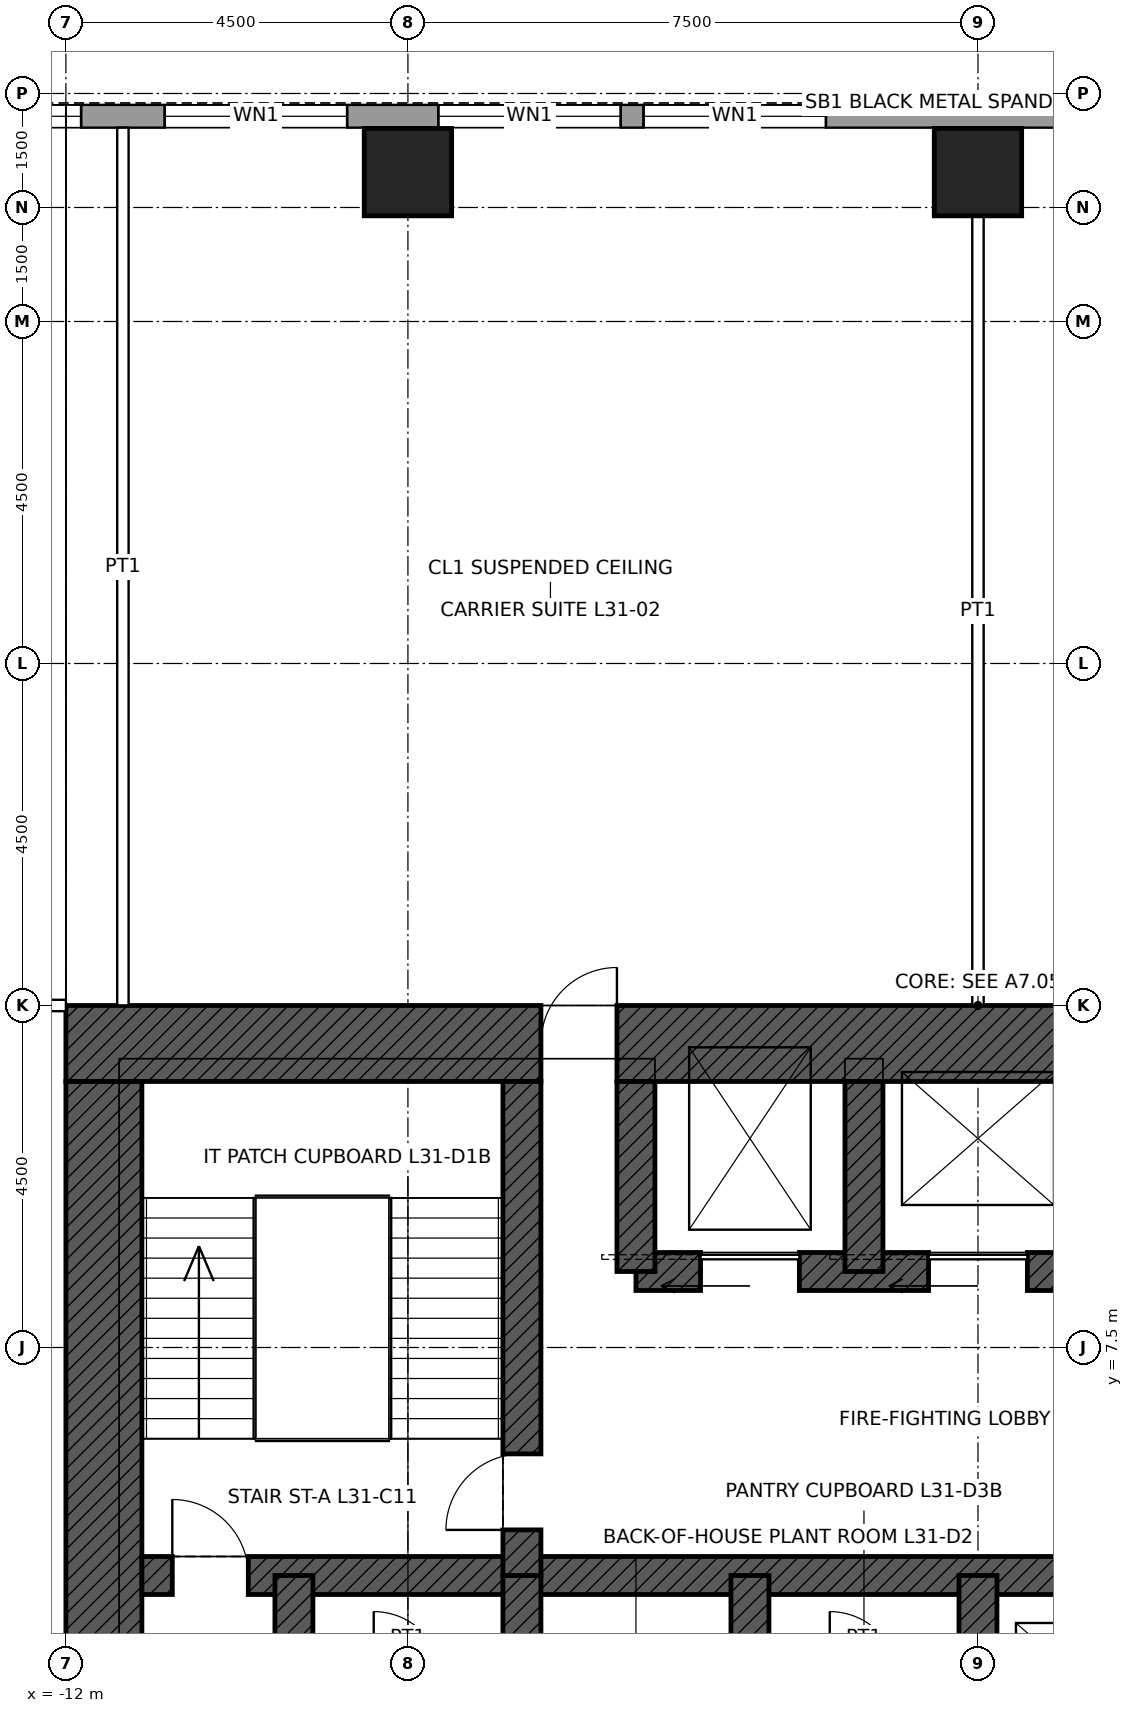
"""IFC4 building model, lengths in metres.
Left out: names, types, materials, properties, quantities, classifications, styles, units other than length and angle.
Written with IfcOpenShell. Run it as: python <this file> out.ifc"""

import sys

from ifc_helpers import new_model, si_unit, direction, frame, frame_2d, origin, origin_2d, place, context, subcontext, project, spatial, rectangle, hollow_rectangle, extrude, element, fill, save


model = new_model("IFC4")
c1 = context("Model", 3, precision=1e-05, world=origin(), true_north=direction((0.0, 1.0)))
c2 = subcontext(c1, "Body", "Model", "MODEL_VIEW")
j1 = project(units=[si_unit("LENGTHUNIT", "METRE"), si_unit("PLANEANGLEUNIT", "RADIAN")], contexts=[c1])
p1 = place(None, origin())
s1 = spatial("IfcSite", under=j1, at=p1, CompositionType="ELEMENT")
p2 = place(p1, origin())
s2 = spatial("IfcBuilding", under=s1, at=p2, CompositionType="ELEMENT")
p3 = place(p2, frame((0.0, 0.0, 153.9)))
s3 = spatial("IfcBuildingStorey", under=s2, at=p3, CompositionType="ELEMENT", Elevation=153.9)
for number, where, z_axis, x_axis in (
    (1, (-7.5, 22.965, 0.0), (0.0, 0.0, 1.0), (1.0, 0.0, 0.0)),
    (2, (0.0, 22.965, 0.0), (0.0, 0.0, 1.0), (1.0, 0.0, 0.0)),
):
    element("IfcColumn", number, at=place(p3, frame(where, z_axis=z_axis, x_axis=x_axis)), inside=s3, PredefinedType="COLUMN", context=c2, shape_type="SweptSolid", body=[
        extrude(hollow_rectangle(XDim=1.15, YDim=1.15, WallThickness=0.075, at=origin_2d()), origin(), (0.0, 0.0, 1.0), 4.5),
    ])
p4 = place(p3, frame((-12.0, 11.5, 0.0), z_axis=(0.0, 0.0, 1.0), x_axis=(1.0, 0.0, 0.0)))
e3 = element("IfcWall", 3, at=p4, inside=s3, PredefinedType="SHEAR", context=c2, shape_type="SweptSolid", body=[
    extrude(rectangle(XDim=24.0, YDim=1.0, at=frame_2d((12.0, 0.0))), origin(), (0.0, 0.0, 1.0), 4.5),
])
p5 = place(p4, frame((6.25, 0.0, 0.0)))
e4 = element("IfcOpeningElement", 4, at=p5, cuts=e3, PredefinedType="OPENING", context=c2, shape_type="SweptSolid", body=[
    extrude(rectangle(XDim=1.0, YDim=2.4, at=frame_2d((0.5, 1.2))), frame((0.0, 0.51, 0.0), z_axis=(0.0, -1.0, 0.0), x_axis=(1.0, 0.0, 0.0)), (0.0, 0.0, 1.0), 1.02),
])
p6 = place(p4, frame((16.75, 0.0, 0.0)))
e5 = element("IfcOpeningElement", 5, at=p6, cuts=e3, PredefinedType="OPENING", context=c2, shape_type="SweptSolid", body=[
    extrude(rectangle(XDim=1.0, YDim=2.4, at=frame_2d((0.5, 1.2))), frame((0.0, 0.51, 0.0), z_axis=(0.0, -1.0, 0.0), x_axis=(1.0, 0.0, 0.0)), (0.0, 0.0, 1.0), 1.02),
])
p7 = place(p3, frame((-11.5, -11.0, 0.0), z_axis=(0.0, 0.0, 1.0), x_axis=(0.0, 1.0, 0.0)))
e6 = element("IfcWall", 6, at=p7, inside=s3, PredefinedType="SHEAR", context=c2, shape_type="SweptSolid", body=[
    extrude(rectangle(XDim=22.0, YDim=1.0, at=frame_2d((11.0, 0.0))), origin(), (0.0, 0.0, 1.0), 4.5),
])
p8 = place(p7, frame((10.5, 0.0, 0.0)))
e7 = element("IfcOpeningElement", 7, at=p8, cuts=e6, PredefinedType="OPENING", context=c2, shape_type="SweptSolid", body=[
    extrude(rectangle(XDim=1.0, YDim=2.4, at=frame_2d((0.5, 1.2))), frame((0.0, 0.51, 0.0), z_axis=(0.0, -1.0, 0.0), x_axis=(1.0, 0.0, 0.0)), (0.0, 0.0, 1.0), 1.02),
])
p9 = place(p3, frame((-11.0, 4.5, 0.0), z_axis=(0.0, 0.0, 1.0), x_axis=(1.0, 0.0, 0.0)))
e8 = element("IfcWall", 8, at=p9, inside=s3, PredefinedType="SHEAR", context=c2, shape_type="SweptSolid", body=[
    extrude(rectangle(XDim=22.0, YDim=0.5, at=frame_2d((11.0, 0.0))), origin(), (0.0, 0.0, 1.0), 4.5),
])
p10 = place(p9, frame((0.4, 0.0, 0.0)))
e9 = element("IfcOpeningElement", 9, at=p10, cuts=e8, PredefinedType="OPENING", context=c2, shape_type="SweptSolid", body=[
    extrude(rectangle(XDim=1.0, YDim=2.1, at=frame_2d((0.5, 1.05))), frame((0.0, 0.26, 0.0), z_axis=(0.0, -1.0, 0.0), x_axis=(1.0, 0.0, 0.0)), (0.0, 0.0, 1.0), 0.52),
])
p11 = place(p9, frame((20.6, 0.0, 0.0)))
e10 = element("IfcOpeningElement", 10, at=p11, cuts=e8, PredefinedType="OPENING", context=c2, shape_type="SweptSolid", body=[
    extrude(rectangle(XDim=1.0, YDim=2.1, at=frame_2d((0.5, 1.05))), frame((0.0, 0.26, 0.0), z_axis=(0.0, -1.0, 0.0), x_axis=(1.0, 0.0, 0.0)), (0.0, 0.0, 1.0), 0.52),
])
p12 = place(p3, frame((-4.5, 8.5, 0.0), z_axis=(0.0, 0.0, 1.0), x_axis=(1.0, 0.0, 0.0)))
e11 = element("IfcWall", 11, at=p12, inside=s3, PredefinedType="SHEAR", context=c2, shape_type="SweptSolid", body=[
    extrude(rectangle(XDim=9.0, YDim=0.5, at=frame_2d((4.5, 0.0))), origin(), (0.0, 0.0, 1.0), 4.5),
])
p13 = place(p12, frame((0.85, 0.0, 0.0)))
e12 = element("IfcOpeningElement", 12, at=p13, cuts=e11, PredefinedType="OPENING", context=c2, shape_type="SweptSolid", body=[
    extrude(rectangle(XDim=1.3, YDim=2.4, at=frame_2d((0.65, 1.2))), frame((0.0, 0.26, 0.0), z_axis=(0.0, -1.0, 0.0), x_axis=(1.0, 0.0, 0.0)), (0.0, 0.0, 1.0), 0.52),
])
p14 = place(p12, frame((6.85, 0.0, 0.0)))
e13 = element("IfcOpeningElement", 13, at=p14, cuts=e11, PredefinedType="OPENING", context=c2, shape_type="SweptSolid", body=[
    extrude(rectangle(XDim=1.3, YDim=2.4, at=frame_2d((0.65, 1.2))), frame((0.0, 0.26, 0.0), z_axis=(0.0, -1.0, 0.0), x_axis=(1.0, 0.0, 0.0)), (0.0, 0.0, 1.0), 0.52),
])
p15 = place(p12, frame((3.85, 0.0, 0.0)))
e14 = element("IfcOpeningElement", 14, at=p15, cuts=e11, PredefinedType="OPENING", context=c2, shape_type="SweptSolid", body=[
    extrude(rectangle(XDim=1.3, YDim=2.4, at=frame_2d((0.65, 1.2))), frame((0.0, 0.26, 0.0), z_axis=(0.0, -1.0, 0.0), x_axis=(1.0, 0.0, 0.0)), (0.0, 0.0, 1.0), 0.52),
])
for number, where, z_axis, x_axis in (
    (15, (-9.0, 1.5, 0.0), (0.0, 0.0, 1.0), (0.0, 1.0, 0.0)),
    (16, (-6.0, 1.5, 0.0), (0.0, 0.0, 1.0), (0.0, 1.0, 0.0)),
    (17, (-3.0, 1.5, 0.0), (0.0, 0.0, 1.0), (0.0, 1.0, 0.0)),
    (18, (0.0, 1.5, 0.0), (0.0, 0.0, 1.0), (0.0, 1.0, 0.0)),
):
    element("IfcWall", number, at=place(p3, frame(where, z_axis=z_axis, x_axis=x_axis)), inside=s3, PredefinedType="SHEAR", context=c2, shape_type="SweptSolid", body=[
        extrude(rectangle(XDim=3.0, YDim=0.5, at=frame_2d((1.5, 0.0))), origin(), (0.0, 0.0, 1.0), 4.5),
    ])
p16 = place(p3, frame((-6.0, 4.5, 0.0), z_axis=(0.0, 0.0, 1.0), x_axis=(0.0, 1.0, 0.0)))
e19 = element("IfcWall", 19, at=p16, inside=s3, PredefinedType="SHEAR", context=c2, shape_type="SweptSolid", body=[
    extrude(rectangle(XDim=6.5, YDim=0.5, at=frame_2d((3.25, 0.0))), origin(), (0.0, 0.0, 1.0), 4.5),
])
p17 = place(p16, frame((0.6, 0.0, 0.0)))
e20 = element("IfcOpeningElement", 20, at=p17, cuts=e19, PredefinedType="OPENING", context=c2, shape_type="SweptSolid", body=[
    extrude(rectangle(XDim=1.0, YDim=2.1, at=frame_2d((0.5, 1.05))), frame((0.0, 0.26, 0.0), z_axis=(0.0, -1.0, 0.0), x_axis=(1.0, 0.0, 0.0)), (0.0, 0.0, 1.0), 0.52),
])
for number, where, z_axis, x_axis in (
    (21, (-4.5, 8.5, 0.0), (0.0, 0.0, 1.0), (0.0, 1.0, 0.0)),
    (22, (-1.5, 8.5, 0.0), (0.0, 0.0, 1.0), (0.0, 1.0, 0.0)),
):
    element("IfcWall", number, at=place(p3, frame(where, z_axis=z_axis, x_axis=x_axis)), inside=s3, PredefinedType="SHEAR", context=c2, shape_type="SweptSolid", body=[
        extrude(rectangle(XDim=2.5, YDim=0.5, at=frame_2d((1.25, 0.0))), origin(), (0.0, 0.0, 1.0), 4.5),
    ])
p18 = place(p3, frame((-16.2, 23.7, 0.0), z_axis=(0.0, 0.0, 1.0), x_axis=(1.0, 0.0, 0.0)))
e23 = element("IfcWall", 23, at=p18, inside=s3, PredefinedType="SOLIDWALL", context=c2, shape_type="SweptSolid", body=[
    extrude(rectangle(XDim=32.4, YDim=0.3, at=frame_2d((16.2, 0.0))), origin(), (0.0, 0.0, 1.0), 4.3),
])
p19 = place(p18, frame((2.0, 0.0, 1.0)))
e24 = element("IfcOpeningElement", 24, at=p19, cuts=e23, PredefinedType="OPENING", context=c2, shape_type="SweptSolid", body=[
    extrude(rectangle(XDim=2.4, YDim=1.2, at=frame_2d((1.2, 0.6))), frame((0.0, 0.16, 0.0), z_axis=(0.0, -1.0, 0.0), x_axis=(1.0, 0.0, 0.0)), (0.0, 0.0, 1.0), 0.32),
])
p20 = place(p18, frame((5.5, 0.0, 1.0)))
e25 = element("IfcOpeningElement", 25, at=p20, cuts=e23, PredefinedType="OPENING", context=c2, shape_type="SweptSolid", body=[
    extrude(rectangle(XDim=2.4, YDim=1.2, at=frame_2d((1.2, 0.6))), frame((0.0, 0.16, 0.0), z_axis=(0.0, -1.0, 0.0), x_axis=(1.0, 0.0, 0.0)), (0.0, 0.0, 1.0), 0.32),
])
p21 = place(p18, frame((9.1, 0.0, 1.0)))
e26 = element("IfcOpeningElement", 26, at=p21, cuts=e23, PredefinedType="OPENING", context=c2, shape_type="SweptSolid", body=[
    extrude(rectangle(XDim=2.4, YDim=1.2, at=frame_2d((1.2, 0.6))), frame((0.0, 0.16, 0.0), z_axis=(0.0, -1.0, 0.0), x_axis=(1.0, 0.0, 0.0)), (0.0, 0.0, 1.0), 0.32),
])
p22 = place(p18, frame((11.8, 0.0, 1.0)))
e27 = element("IfcOpeningElement", 27, at=p22, cuts=e23, PredefinedType="OPENING", context=c2, shape_type="SweptSolid", body=[
    extrude(rectangle(XDim=2.4, YDim=1.2, at=frame_2d((1.2, 0.6))), frame((0.0, 0.16, 0.0), z_axis=(0.0, -1.0, 0.0), x_axis=(1.0, 0.0, 0.0)), (0.0, 0.0, 1.0), 0.32),
])
p23 = place(p18, frame((18.2, 0.0, 1.0)))
e28 = element("IfcOpeningElement", 28, at=p23, cuts=e23, PredefinedType="OPENING", context=c2, shape_type="SweptSolid", body=[
    extrude(rectangle(XDim=2.4, YDim=1.2, at=frame_2d((1.2, 0.6))), frame((0.0, 0.16, 0.0), z_axis=(0.0, -1.0, 0.0), x_axis=(1.0, 0.0, 0.0)), (0.0, 0.0, 1.0), 0.32),
])
p24 = place(p18, frame((20.9, 0.0, 1.0)))
e29 = element("IfcOpeningElement", 29, at=p24, cuts=e23, PredefinedType="OPENING", context=c2, shape_type="SweptSolid", body=[
    extrude(rectangle(XDim=2.4, YDim=1.2, at=frame_2d((1.2, 0.6))), frame((0.0, 0.16, 0.0), z_axis=(0.0, -1.0, 0.0), x_axis=(1.0, 0.0, 0.0)), (0.0, 0.0, 1.0), 0.32),
])
p25 = place(p18, frame((24.5, 0.0, 1.0)))
e30 = element("IfcOpeningElement", 30, at=p25, cuts=e23, PredefinedType="OPENING", context=c2, shape_type="SweptSolid", body=[
    extrude(rectangle(XDim=2.4, YDim=1.2, at=frame_2d((1.2, 0.6))), frame((0.0, 0.16, 0.0), z_axis=(0.0, -1.0, 0.0), x_axis=(1.0, 0.0, 0.0)), (0.0, 0.0, 1.0), 0.32),
])
p26 = place(p18, frame((28.0, 0.0, 1.0)))
e31 = element("IfcOpeningElement", 31, at=p26, cuts=e23, PredefinedType="OPENING", context=c2, shape_type="SweptSolid", body=[
    extrude(rectangle(XDim=2.4, YDim=1.2, at=frame_2d((1.2, 0.6))), frame((0.0, 0.16, 0.0), z_axis=(0.0, -1.0, 0.0), x_axis=(1.0, 0.0, 0.0)), (0.0, 0.0, 1.0), 0.32),
])
p27 = place(p3, frame((-14.075, 12.0, 0.0), z_axis=(0.0, 0.0, 1.0), x_axis=(1.0, 0.0, 0.0)))
e32 = element("IfcWall", 32, at=p27, inside=s3, PredefinedType="PARTITIONING", context=c2, shape_type="SweptSolid", body=[
    extrude(rectangle(XDim=2.075, YDim=0.15, at=frame_2d((1.038, 0.0))), origin(), (0.0, 0.0, 1.0), 4.3),
])
p28 = place(p27, frame((0.575, 0.0, 0.0)))
e33 = element("IfcOpeningElement", 33, at=p28, cuts=e32, PredefinedType="OPENING", context=c2, shape_type="SweptSolid", body=[
    extrude(rectangle(XDim=1.0, YDim=2.1, at=frame_2d((0.5, 1.05))), frame((0.0, 0.085, 0.0), z_axis=(0.0, -1.0, 0.0), x_axis=(1.0, 0.0, 0.0)), (0.0, 0.0, 1.0), 0.17),
])
p29 = place(p3, frame((-11.25, 12.0, 0.0), z_axis=(0.0, 0.0, 1.0), x_axis=(0.0, 1.0, 0.0)))
e34 = element("IfcWall", 34, at=p29, inside=s3, PredefinedType="PARTITIONING", context=c2, shape_type="SweptSolid", body=[
    extrude(rectangle(XDim=11.55, YDim=0.15, at=frame_2d((5.775, 0.0))), origin(), (0.0, 0.0, 1.0), 3.431),
])
p30 = place(p3, frame((0.0, 12.0, 0.0), z_axis=(0.0, 0.0, 1.0), x_axis=(0.0, 1.0, 0.0)))
e35 = element("IfcWall", 35, at=p30, inside=s3, PredefinedType="PARTITIONING", context=c2, shape_type="SweptSolid", body=[
    extrude(rectangle(XDim=10.39, YDim=0.15, at=frame_2d((5.195, 0.0))), origin(), (0.0, 0.0, 1.0), 3.431),
])
p31 = place(p19, origin())
e36 = element("IfcWindow", 36, at=p31, inside=s3, PartitioningType="SINGLE_PANEL", PredefinedType="WINDOW", context=c2, shape_type="SweptSolid", body=[
    extrude(rectangle(XDim=2.4, YDim=1.2, at=frame_2d((1.2, 0.6))), frame((0.0, 0.03, 0.0), z_axis=(0.0, -1.0, 0.0), x_axis=(1.0, 0.0, 0.0)), (0.0, 0.0, 1.0), 0.06),
])
fill(e24, e36)
p32 = place(p20, origin())
e37 = element("IfcWindow", 37, at=p32, inside=s3, PartitioningType="SINGLE_PANEL", PredefinedType="WINDOW", context=c2, shape_type="SweptSolid", body=[
    extrude(rectangle(XDim=2.4, YDim=1.2, at=frame_2d((1.2, 0.6))), frame((0.0, 0.03, 0.0), z_axis=(0.0, -1.0, 0.0), x_axis=(1.0, 0.0, 0.0)), (0.0, 0.0, 1.0), 0.06),
])
fill(e25, e37)
p33 = place(p21, origin())
e38 = element("IfcWindow", 38, at=p33, inside=s3, PartitioningType="SINGLE_PANEL", PredefinedType="WINDOW", context=c2, shape_type="SweptSolid", body=[
    extrude(rectangle(XDim=2.4, YDim=1.2, at=frame_2d((1.2, 0.6))), frame((0.0, 0.03, 0.0), z_axis=(0.0, -1.0, 0.0), x_axis=(1.0, 0.0, 0.0)), (0.0, 0.0, 1.0), 0.06),
])
fill(e26, e38)
p34 = place(p22, origin())
e39 = element("IfcWindow", 39, at=p34, inside=s3, PartitioningType="SINGLE_PANEL", PredefinedType="WINDOW", context=c2, shape_type="SweptSolid", body=[
    extrude(rectangle(XDim=2.4, YDim=1.2, at=frame_2d((1.2, 0.6))), frame((0.0, 0.03, 0.0), z_axis=(0.0, -1.0, 0.0), x_axis=(1.0, 0.0, 0.0)), (0.0, 0.0, 1.0), 0.06),
])
fill(e27, e39)
p35 = place(p10, origin())
e40 = element("IfcDoor", 40, at=p35, inside=s3, OperationType="SINGLE_SWING_LEFT", PredefinedType="DOOR", context=c2, shape_type="SweptSolid", body=[
    extrude(rectangle(XDim=1.0, YDim=2.1, at=frame_2d((0.5, 1.05))), frame((0.0, 0.025, 0.0), z_axis=(0.0, -1.0, 0.0), x_axis=(1.0, 0.0, 0.0)), (0.0, 0.0, 1.0), 0.05),
])
fill(e9, e40)
p36 = place(p17, origin())
e41 = element("IfcDoor", 41, at=p36, inside=s3, OperationType="SINGLE_SWING_LEFT", PredefinedType="DOOR", context=c2, shape_type="SweptSolid", body=[
    extrude(rectangle(XDim=1.0, YDim=2.1, at=frame_2d((0.5, 1.05))), frame((0.0, 0.025, 0.0), z_axis=(0.0, -1.0, 0.0), x_axis=(1.0, 0.0, 0.0)), (0.0, 0.0, 1.0), 0.05),
])
fill(e20, e41)
p37 = place(p5, origin())
e42 = element("IfcDoor", 42, at=p37, inside=s3, OperationType="SINGLE_SWING_RIGHT", PredefinedType="DOOR", context=c2, shape_type="SweptSolid", body=[
    extrude(rectangle(XDim=1.0, YDim=2.4, at=frame_2d((0.5, 1.2))), frame((0.0, 0.485, 0.0), z_axis=(0.0, -1.0, 0.0), x_axis=(1.0, 0.0, 0.0)), (0.0, 0.0, 1.0), 0.05),
])
fill(e4, e42)
p38 = place(p13, origin())
e43 = element("IfcDoor", 43, at=p38, inside=s3, OperationType="SLIDING_TO_LEFT", PredefinedType="DOOR", context=c2, shape_type="SweptSolid", body=[
    extrude(rectangle(XDim=1.3, YDim=2.4, at=frame_2d((0.65, 1.2))), frame((0.0, 0.025, 0.0), z_axis=(0.0, -1.0, 0.0), x_axis=(1.0, 0.0, 0.0)), (0.0, 0.0, 1.0), 0.05),
])
fill(e12, e43)
p39 = place(p15, origin())
e44 = element("IfcDoor", 44, at=p39, inside=s3, OperationType="SLIDING_TO_LEFT", PredefinedType="DOOR", context=c2, shape_type="SweptSolid", body=[
    extrude(rectangle(XDim=1.3, YDim=2.4, at=frame_2d((0.65, 1.2))), frame((0.0, 0.025, 0.0), z_axis=(0.0, -1.0, 0.0), x_axis=(1.0, 0.0, 0.0)), (0.0, 0.0, 1.0), 0.05),
])
fill(e14, e44)
save(model, sys.argv[1])
